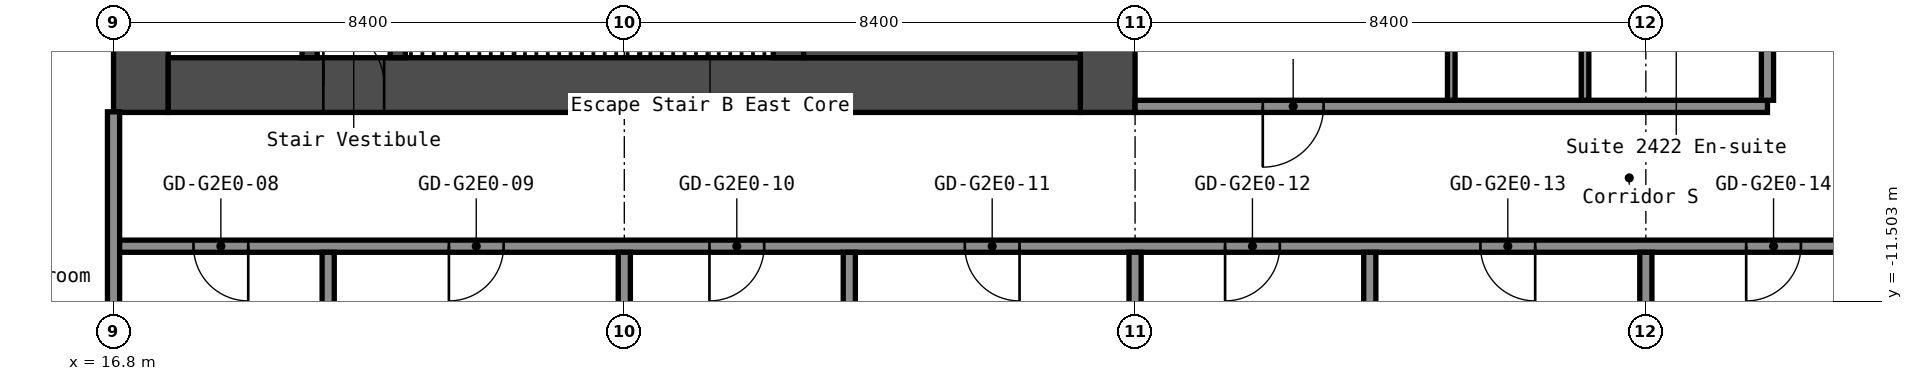
"""IFC4 building model, lengths in metres.
Left out: names, types, materials, properties, quantities, classifications, styles, units other than length and angle.
Written with IfcOpenShell. Run it as: python <this file> out.ifc"""

import sys

from ifc_helpers import new_model, si_unit, direction, frame, frame_2d, origin, place, context, subcontext, project, spatial, rectangle, extrude, element, fill, save


model = new_model("IFC4")
c1 = context("Model", 3, precision=1e-05, world=origin(), true_north=direction((0.0, 1.0)))
c2 = subcontext(c1, "Body", "Model", "MODEL_VIEW")
j1 = project(units=[si_unit("LENGTHUNIT", "METRE"), si_unit("PLANEANGLEUNIT", "RADIAN")], contexts=[c1])
p1 = place(None, origin())
s1 = spatial("IfcSite", under=j1, at=p1, CompositionType="ELEMENT")
p2 = place(p1, origin())
s2 = spatial("IfcBuilding", under=s1, at=p2, CompositionType="ELEMENT")
p3 = place(p2, frame((0.0, 0.0, 88.2)))
s3 = spatial("IfcBuildingStorey", under=s2, at=p3, CompositionType="ELEMENT", Elevation=88.2)
p4 = place(p3, frame((17.25, -8.4, 0.0), z_axis=(0.0, 0.0, 1.0), x_axis=(0.0, 1.0, 0.0)))
e1 = element("IfcWall", 1, at=p4, inside=s3, PredefinedType="SHEAR", context=c2, shape_type="SweptSolid", body=[
    extrude(rectangle(XDim=16.8, YDim=0.9, at=frame_2d((8.4, 0.0))), origin(), (0.0, 0.0, 1.0), 2.8),
])
p5 = place(p4, frame((7.6, 0.0, 0.0)))
e2 = element("IfcOpeningElement", 2, at=p5, cuts=e1, PredefinedType="OPENING", context=c2, shape_type="SweptSolid", body=[
    extrude(rectangle(XDim=1.2, YDim=2.1, at=frame_2d((0.6, 1.05))), frame((0.0, 0.46, 0.0), z_axis=(0.0, -1.0, 0.0), x_axis=(1.0, 0.0, 0.0)), (0.0, 0.0, 1.0), 0.92),
])
p6 = place(p3, frame((33.15, -8.4, 0.0), z_axis=(0.0, 0.0, 1.0), x_axis=(0.0, 1.0, 0.0)))
e3 = element("IfcWall", 3, at=p6, inside=s3, PredefinedType="SHEAR", context=c2, shape_type="SweptSolid", body=[
    extrude(rectangle(XDim=16.8, YDim=0.9, at=frame_2d((8.4, 0.0))), origin(), (0.0, 0.0, 1.0), 2.8),
])
p7 = place(p3, frame((17.7, -7.95, 0.0), z_axis=(0.0, 0.0, 1.0), x_axis=(1.0, 0.0, 0.0)))
e4 = element("IfcWall", 4, at=p7, inside=s3, PredefinedType="SHEAR", context=c2, shape_type="SweptSolid", body=[
    extrude(rectangle(XDim=15.0, YDim=0.9, at=frame_2d((7.5, 0.0))), origin(), (0.0, 0.0, 1.0), 2.8),
])
p8 = place(p7, frame((2.55, 0.0, 0.0)))
e5 = element("IfcOpeningElement", 5, at=p8, cuts=e4, PredefinedType="OPENING", context=c2, shape_type="SweptSolid", body=[
    extrude(rectangle(XDim=1.0, YDim=2.1, at=frame_2d((0.5, 1.05))), frame((0.0, 0.46, 0.0), z_axis=(0.0, -1.0, 0.0), x_axis=(1.0, 0.0, 0.0)), (0.0, 0.0, 1.0), 0.92),
])
p9 = place(p3, frame((20.025, -7.5, 0.0), z_axis=(0.0, 0.0, 1.0), x_axis=(0.0, 1.0, 0.0)))
e6 = element("IfcWall", 6, at=p9, inside=s3, PredefinedType="SHEAR", context=c2, shape_type="SweptSolid", body=[
    extrude(rectangle(XDim=6.3, YDim=0.25, at=frame_2d((3.15, 0.0))), origin(), (0.0, 0.0, 1.0), 2.8),
])
p10 = place(p9, frame((2.4, 0.0, 0.0)))
e7 = element("IfcOpeningElement", 7, at=p10, cuts=e6, PredefinedType="OPENING", context=c2, shape_type="SweptSolid", body=[
    extrude(rectangle(XDim=1.0, YDim=2.1, at=frame_2d((0.5, 1.05))), frame((0.0, 0.135, 0.0), z_axis=(0.0, -1.0, 0.0), x_axis=(1.0, 0.0, 0.0)), (0.0, 0.0, 1.0), 0.27),
])
p11 = place(p3, frame((21.475, -7.5, 0.0), z_axis=(0.0, 0.0, 1.0), x_axis=(0.0, 1.0, 0.0)))
e8 = element("IfcWall", 8, at=p11, inside=s3, PredefinedType="SHEAR", context=c2, shape_type="SweptSolid", body=[
    extrude(rectangle(XDim=3.75, YDim=0.25, at=frame_2d((1.875, 0.0))), origin(), (0.0, 0.0, 1.0), 2.8),
])
p12 = place(p11, frame((1.3, 0.0, 0.0)))
e9 = element("IfcOpeningElement", 9, at=p12, cuts=e8, PredefinedType="OPENING", context=c2, shape_type="SweptSolid", body=[
    extrude(rectangle(XDim=1.2, YDim=2.1, at=frame_2d((0.6, 1.05))), frame((0.0, 0.135, 0.0), z_axis=(0.0, -1.0, 0.0), x_axis=(1.0, 0.0, 0.0)), (0.0, 0.0, 1.0), 0.27),
])
p13 = place(p3, frame((27.9, -7.5, 0.0), z_axis=(0.0, 0.0, 1.0), x_axis=(0.0, 1.0, 0.0)))
e10 = element("IfcWall", 10, at=p13, inside=s3, PredefinedType="SHEAR", context=c2, shape_type="SweptSolid", body=[
    extrude(rectangle(XDim=3.75, YDim=0.5, at=frame_2d((1.875, 0.0))), origin(), (0.0, 0.0, 1.0), 2.8),
])
p14 = place(p3, frame((28.15, -6.75, 0.0), z_axis=(0.0, 0.0, 1.0), x_axis=(1.0, 0.0, 0.0)))
e11 = element("IfcWall", 11, at=p14, inside=s3, PredefinedType="SHEAR", context=c2, shape_type="SweptSolid", body=[
    extrude(rectangle(XDim=4.55, YDim=1.5, at=frame_2d((2.275, 0.0))), origin(), (0.0, 0.0, 1.0), 2.8),
])
p15 = place(p3, frame((16.8, -10.6, 0.0), z_axis=(0.0, 0.0, 1.0), x_axis=(1.0, 0.0, 0.0)))
e12 = element("IfcWall", 12, at=p15, inside=s3, PredefinedType="PARTITIONING", context=c2, shape_type="SweptSolid", body=[
    extrude(rectangle(XDim=29.7, YDim=0.2, at=frame_2d((14.85, 0.0))), origin(), (0.0, 0.0, 1.0), 2.8),
])
p16 = place(p15, frame((1.315, 0.0, 0.0)))
e13 = element("IfcOpeningElement", 13, at=p16, cuts=e12, PredefinedType="OPENING", context=c2, shape_type="SweptSolid", body=[
    extrude(rectangle(XDim=0.9, YDim=2.1, at=frame_2d((0.45, 1.05))), frame((0.0, 0.11, 0.0), z_axis=(0.0, -1.0, 0.0), x_axis=(1.0, 0.0, 0.0)), (0.0, 0.0, 1.0), 0.22),
])
p17 = place(p15, frame((5.515, 0.0, 0.0)))
e14 = element("IfcOpeningElement", 14, at=p17, cuts=e12, PredefinedType="OPENING", context=c2, shape_type="SweptSolid", body=[
    extrude(rectangle(XDim=0.9, YDim=2.1, at=frame_2d((0.45, 1.05))), frame((0.0, 0.11, 0.0), z_axis=(0.0, -1.0, 0.0), x_axis=(1.0, 0.0, 0.0)), (0.0, 0.0, 1.0), 0.22),
])
p18 = place(p15, frame((9.8, 0.0, 0.0)))
e15 = element("IfcOpeningElement", 15, at=p18, cuts=e12, PredefinedType="OPENING", context=c2, shape_type="SweptSolid", body=[
    extrude(rectangle(XDim=0.9, YDim=2.1, at=frame_2d((0.45, 1.05))), frame((0.0, 0.11, 0.0), z_axis=(0.0, -1.0, 0.0), x_axis=(1.0, 0.0, 0.0)), (0.0, 0.0, 1.0), 0.22),
])
p19 = place(p15, frame((14.0, 0.0, 0.0)))
e16 = element("IfcOpeningElement", 16, at=p19, cuts=e12, PredefinedType="OPENING", context=c2, shape_type="SweptSolid", body=[
    extrude(rectangle(XDim=0.9, YDim=2.1, at=frame_2d((0.45, 1.05))), frame((0.0, 0.11, 0.0), z_axis=(0.0, -1.0, 0.0), x_axis=(1.0, 0.0, 0.0)), (0.0, 0.0, 1.0), 0.22),
])
p20 = place(p15, frame((18.28, 0.0, 0.0)))
e17 = element("IfcOpeningElement", 17, at=p20, cuts=e12, PredefinedType="OPENING", context=c2, shape_type="SweptSolid", body=[
    extrude(rectangle(XDim=0.9, YDim=2.1, at=frame_2d((0.45, 1.05))), frame((0.0, 0.11, 0.0), z_axis=(0.0, -1.0, 0.0), x_axis=(1.0, 0.0, 0.0)), (0.0, 0.0, 1.0), 0.22),
])
p21 = place(p15, frame((22.48, 0.0, 0.0)))
e18 = element("IfcOpeningElement", 18, at=p21, cuts=e12, PredefinedType="OPENING", context=c2, shape_type="SweptSolid", body=[
    extrude(rectangle(XDim=0.9, YDim=2.1, at=frame_2d((0.45, 1.05))), frame((0.0, 0.11, 0.0), z_axis=(0.0, -1.0, 0.0), x_axis=(1.0, 0.0, 0.0)), (0.0, 0.0, 1.0), 0.22),
])
p22 = place(p15, frame((26.85, 0.0, 0.0)))
e19 = element("IfcOpeningElement", 19, at=p22, cuts=e12, PredefinedType="OPENING", context=c2, shape_type="SweptSolid", body=[
    extrude(rectangle(XDim=0.9, YDim=2.1, at=frame_2d((0.45, 1.05))), frame((0.0, 0.11, 0.0), z_axis=(0.0, -1.0, 0.0), x_axis=(1.0, 0.0, 0.0)), (0.0, 0.0, 1.0), 0.22),
])
p23 = place(p3, frame((33.6, -8.3, 0.0), z_axis=(0.0, 0.0, 1.0), x_axis=(1.0, 0.0, 0.0)))
e20 = element("IfcWall", 20, at=p23, inside=s3, PredefinedType="PARTITIONING", context=c2, shape_type="SweptSolid", body=[
    extrude(rectangle(XDim=10.4, YDim=0.2, at=frame_2d((5.2, 0.0))), origin(), (0.0, 0.0, 1.0), 2.8),
])
p24 = place(p23, frame((2.1, 0.0, 0.0)))
e21 = element("IfcOpeningElement", 21, at=p24, cuts=e20, PredefinedType="OPENING", context=c2, shape_type="SweptSolid", body=[
    extrude(rectangle(XDim=1.0, YDim=2.1, at=frame_2d((0.5, 1.05))), frame((0.0, 0.11, 0.0), z_axis=(0.0, -1.0, 0.0), x_axis=(1.0, 0.0, 0.0)), (0.0, 0.0, 1.0), 0.22),
])
p25 = place(p3, frame((16.8, -15.55, 0.0), z_axis=(0.0, 0.0, 1.0), x_axis=(0.0, 1.0, 0.0)))
e22 = element("IfcWall", 22, at=p25, inside=s3, PredefinedType="PARTITIONING", context=c2, shape_type="SweptSolid", body=[
    extrude(rectangle(XDim=7.16, YDim=0.2, at=frame_2d((3.58, 0.0))), origin(), (0.0, 0.0, 1.0), 2.8),
])
for number, where, z_axis, x_axis in (
    (23, (20.33, -15.55, 0.0), (0.0, 0.0, 1.0), (0.0, 1.0, 0.0)),
    (24, (25.2, -15.55, 0.0), (0.0, 0.0, 1.0), (0.0, 1.0, 0.0)),
    (25, (28.9, -15.55, 0.0), (0.0, 0.0, 1.0), (0.0, 1.0, 0.0)),
    (26, (33.6, -15.55, 0.0), (0.0, 0.0, 1.0), (0.0, 1.0, 0.0)),
    (27, (37.46, -15.55, 0.0), (0.0, 0.0, 1.0), (0.0, 1.0, 0.0)),
):
    element("IfcWall", number, at=place(p3, frame(where, z_axis=z_axis, x_axis=x_axis)), inside=s3, PredefinedType="PARTITIONING", context=c2, shape_type="SweptSolid", body=[
        extrude(rectangle(XDim=4.85, YDim=0.2, at=frame_2d((2.425, 0.0))), origin(), (0.0, 0.0, 1.0), 2.8),
    ])
p26 = place(p3, frame((38.8, -8.2, 0.0), z_axis=(0.0, 0.0, 1.0), x_axis=(0.0, 1.0, 0.0)))
e28 = element("IfcWall", 28, at=p26, inside=s3, PredefinedType="PARTITIONING", context=c2, shape_type="SweptSolid", body=[
    extrude(rectangle(XDim=16.4, YDim=0.125, at=frame_2d((8.2, 0.0))), origin(), (0.0, 0.0, 1.0), 2.8),
])
p27 = place(p26, frame((4.05, 0.0, 0.0)))
e29 = element("IfcOpeningElement", 29, at=p27, cuts=e28, PredefinedType="OPENING", context=c2, shape_type="SweptSolid", body=[
    extrude(rectangle(XDim=0.9, YDim=2.1, at=frame_2d((0.45, 1.05))), frame((0.0, 0.073, 0.0), z_axis=(0.0, -1.0, 0.0), x_axis=(1.0, 0.0, 0.0)), (0.0, 0.0, 1.0), 0.145),
])
p28 = place(p26, frame((11.45, 0.0, 0.0)))
e30 = element("IfcOpeningElement", 30, at=p28, cuts=e28, PredefinedType="OPENING", context=c2, shape_type="SweptSolid", body=[
    extrude(rectangle(XDim=0.9, YDim=2.1, at=frame_2d((0.45, 1.05))), frame((0.0, 0.073, 0.0), z_axis=(0.0, -1.0, 0.0), x_axis=(1.0, 0.0, 0.0)), (0.0, 0.0, 1.0), 0.145),
])
p29 = place(p3, frame((41.0, -8.2, 0.0), z_axis=(0.0, 0.0, 1.0), x_axis=(0.0, 1.0, 0.0)))
e31 = element("IfcWall", 31, at=p29, inside=s3, PredefinedType="PARTITIONING", context=c2, shape_type="SweptSolid", body=[
    extrude(rectangle(XDim=3.1, YDim=0.125, at=frame_2d((1.55, 0.0))), origin(), (0.0, 0.0, 1.0), 2.8),
])
p30 = place(p3, frame((42.0, -15.55, 0.0), z_axis=(0.0, 0.0, 1.0), x_axis=(0.0, 1.0, 0.0)))
e32 = element("IfcWall", 32, at=p30, inside=s3, PredefinedType="PARTITIONING", context=c2, shape_type="SweptSolid", body=[
    extrude(rectangle(XDim=4.85, YDim=0.2, at=frame_2d((2.425, 0.0))), origin(), (0.0, 0.0, 1.0), 2.8),
])
p31 = place(p3, frame((44.0, -8.2, 0.0), z_axis=(0.0, 0.0, 1.0), x_axis=(0.0, 1.0, 0.0)))
e33 = element("IfcWall", 33, at=p31, inside=s3, PredefinedType="PARTITIONING", context=c2, shape_type="SweptSolid", body=[
    extrude(rectangle(XDim=16.4, YDim=0.2, at=frame_2d((8.2, 0.0))), origin(), (0.0, 0.0, 1.0), 2.8),
])
p32 = place(p8, origin())
e34 = element("IfcDoor", 34, at=p32, inside=s3, OperationType="SINGLE_SWING_RIGHT", PredefinedType="DOOR", context=c2, shape_type="SweptSolid", body=[
    extrude(rectangle(XDim=1.0, YDim=2.1, at=frame_2d((0.5, 1.05))), frame((0.0, 0.025, 0.0), z_axis=(0.0, -1.0, 0.0), x_axis=(1.0, 0.0, 0.0)), (0.0, 0.0, 1.0), 0.05),
])
fill(e5, e34)
p33 = place(p16, origin())
e35 = element("IfcDoor", 35, at=p33, inside=s3, OperationType="SINGLE_SWING_RIGHT", PredefinedType="DOOR", context=c2, shape_type="SweptSolid", body=[
    extrude(rectangle(XDim=0.9, YDim=2.1, at=frame_2d((0.45, 1.05))), frame((0.0, 0.025, 0.0), z_axis=(0.0, -1.0, 0.0), x_axis=(1.0, 0.0, 0.0)), (0.0, 0.0, 1.0), 0.05),
])
fill(e13, e35)
p34 = place(p17, origin())
e36 = element("IfcDoor", 36, at=p34, inside=s3, OperationType="SINGLE_SWING_LEFT", PredefinedType="DOOR", context=c2, shape_type="SweptSolid", body=[
    extrude(rectangle(XDim=0.9, YDim=2.1, at=frame_2d((0.45, 1.05))), frame((0.0, 0.025, 0.0), z_axis=(0.0, -1.0, 0.0), x_axis=(1.0, 0.0, 0.0)), (0.0, 0.0, 1.0), 0.05),
])
fill(e14, e36)
p35 = place(p18, origin())
e37 = element("IfcDoor", 37, at=p35, inside=s3, OperationType="SINGLE_SWING_LEFT", PredefinedType="DOOR", context=c2, shape_type="SweptSolid", body=[
    extrude(rectangle(XDim=0.9, YDim=2.1, at=frame_2d((0.45, 1.05))), frame((0.0, 0.025, 0.0), z_axis=(0.0, -1.0, 0.0), x_axis=(1.0, 0.0, 0.0)), (0.0, 0.0, 1.0), 0.05),
])
fill(e15, e37)
p36 = place(p19, origin())
e38 = element("IfcDoor", 38, at=p36, inside=s3, OperationType="SINGLE_SWING_RIGHT", PredefinedType="DOOR", context=c2, shape_type="SweptSolid", body=[
    extrude(rectangle(XDim=0.9, YDim=2.1, at=frame_2d((0.45, 1.05))), frame((0.0, 0.025, 0.0), z_axis=(0.0, -1.0, 0.0), x_axis=(1.0, 0.0, 0.0)), (0.0, 0.0, 1.0), 0.05),
])
fill(e16, e38)
p37 = place(p20, origin())
e39 = element("IfcDoor", 39, at=p37, inside=s3, OperationType="SINGLE_SWING_LEFT", PredefinedType="DOOR", context=c2, shape_type="SweptSolid", body=[
    extrude(rectangle(XDim=0.9, YDim=2.1, at=frame_2d((0.45, 1.05))), frame((0.0, 0.025, 0.0), z_axis=(0.0, -1.0, 0.0), x_axis=(1.0, 0.0, 0.0)), (0.0, 0.0, 1.0), 0.05),
])
fill(e17, e39)
p38 = place(p21, origin())
e40 = element("IfcDoor", 40, at=p38, inside=s3, OperationType="SINGLE_SWING_RIGHT", PredefinedType="DOOR", context=c2, shape_type="SweptSolid", body=[
    extrude(rectangle(XDim=0.9, YDim=2.1, at=frame_2d((0.45, 1.05))), frame((0.0, 0.025, 0.0), z_axis=(0.0, -1.0, 0.0), x_axis=(1.0, 0.0, 0.0)), (0.0, 0.0, 1.0), 0.05),
])
fill(e18, e40)
p39 = place(p22, origin())
e41 = element("IfcDoor", 41, at=p39, inside=s3, OperationType="SINGLE_SWING_LEFT", PredefinedType="DOOR", context=c2, shape_type="SweptSolid", body=[
    extrude(rectangle(XDim=0.9, YDim=2.1, at=frame_2d((0.45, 1.05))), frame((0.0, 0.025, 0.0), z_axis=(0.0, -1.0, 0.0), x_axis=(1.0, 0.0, 0.0)), (0.0, 0.0, 1.0), 0.05),
])
fill(e19, e41)
p40 = place(p24, origin())
e42 = element("IfcDoor", 42, at=p40, inside=s3, OperationType="SINGLE_SWING_LEFT", PredefinedType="DOOR", context=c2, shape_type="SweptSolid", body=[
    extrude(rectangle(XDim=1.0, YDim=2.1, at=frame_2d((0.5, 1.05))), frame((0.0, 0.025, 0.0), z_axis=(0.0, -1.0, 0.0), x_axis=(1.0, 0.0, 0.0)), (0.0, 0.0, 1.0), 0.05),
])
fill(e21, e42)
save(model, sys.argv[1])
